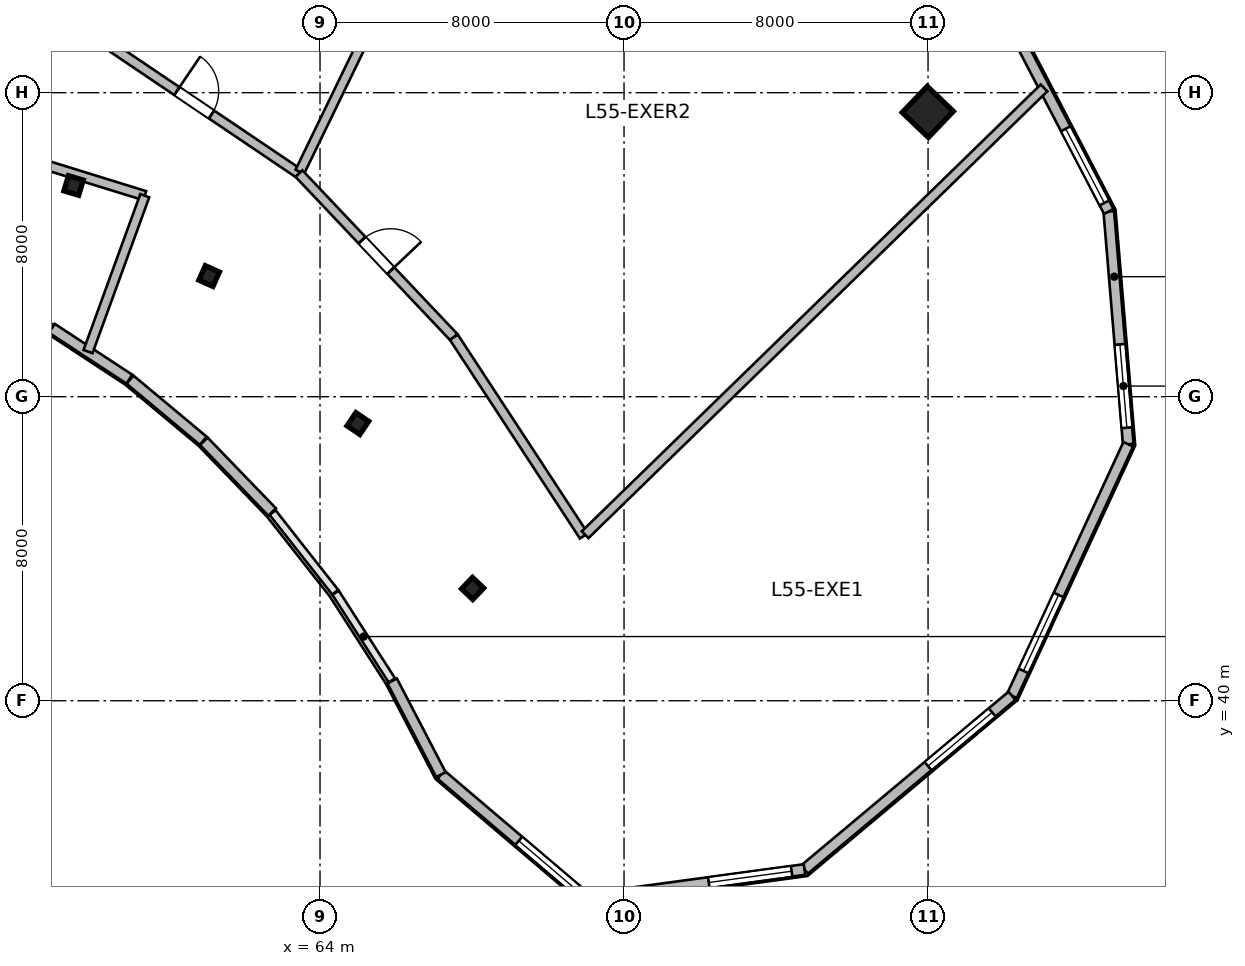
"""IFC4 building model, lengths in metres.
Left out: names, types, materials, properties, quantities, classifications, styles, units other than length and angle.
Written with IfcOpenShell. Run it as: python <this file> out.ifc"""

import sys

from ifc_helpers import new_model, si_unit, direction, frame, frame_2d, origin, origin_2d, place, context, subcontext, project, spatial, rectangle, i_section, extrude, source, transform, mapped, element, fill, save


model = new_model("IFC4")
c1 = context("Model", 3, precision=1e-05, world=origin(), true_north=direction((0.0, 1.0)))
c2 = subcontext(c1, "Body", "Model", "MODEL_VIEW")
j1 = project(units=[si_unit("LENGTHUNIT", "METRE"), si_unit("PLANEANGLEUNIT", "RADIAN")], contexts=[c1])
p1 = place(None, origin())
s1 = spatial("IfcSite", under=j1, at=p1, CompositionType="ELEMENT")
p2 = place(p1, origin())
s2 = spatial("IfcBuilding", under=s1, at=p2, CompositionType="ELEMENT")
p3 = place(p2, frame((0.0, 0.0, 227.4)))
s3 = spatial("IfcBuildingStorey", under=s2, at=p3, CompositionType="ELEMENT", Elevation=227.4)
m1 = source(origin(), c2, "Body", "SweptSolid", [
    extrude(i_section(OverallWidth=0.406, OverallDepth=0.416, WebThickness=0.03, FlangeThickness=0.048, at=origin_2d()), origin(), (0.0, 0.0, 1.0), 3.9),
])
for number, where, z_axis, x_axis in (
    (1, (57.515, 53.558, 0.0), (0.0, 0.0, 1.0), (0.289, 0.957, 0.0)),
    (2, (61.082, 51.175, 0.0), (0.0, 0.0, 1.0), (0.409, 0.912, 0.0)),
    (3, (64.996, 47.294, 0.0), (0.0, 0.0, 1.0), (0.558, 0.83, 0.0)),
    (4, (68.015, 42.955, 0.0), (0.0, 0.0, 1.0), (0.691, 0.723, 0.0)),
):
    element("IfcColumn", number, at=place(p3, frame(where, z_axis=z_axis, x_axis=x_axis)), inside=s3, PredefinedType="COLUMN", context=c2, shape_type="MappedRepresentation", body=[
        mapped(m1, transform((0.0, 0.0, 0.0), scale=1.0)),
    ])
m2 = source(origin(), c2, "Body", "SweptSolid", [
    extrude(rectangle(XDim=0.95, YDim=0.95, at=origin_2d()), origin(), (0.0, 0.0, 1.0), 3.9),
])
p4 = place(p3, frame((79.993, 55.494, 0.0), z_axis=(0.0, 0.0, 1.0), x_axis=(0.690756218984, 0.723087716626, 0.0)))
e5 = element("IfcColumn", 5, at=p4, inside=s3, PredefinedType="COLUMN", context=c2, shape_type="MappedRepresentation", body=[
    mapped(m2, transform((0.0, 0.0, 0.0), scale=1.0)),
])
m3 = source(origin(), c2, "Body", "SweptSolid", [
    extrude(rectangle(XDim=6.146, YDim=0.28, at=frame_2d((3.073, 0.0))), origin(), (0.0, 0.0, 1.0), 3.65),
])
p5 = place(p3, frame((84.756, 52.874, 0.0), z_axis=(0.0, 0.0, 1.0), x_axis=(0.083301904456, -0.996524356307, 0.0)))
e6 = element("IfcWall", 6, at=p5, inside=s3, PredefinedType="SOLIDWALL", context=c2, shape_type="MappedRepresentation", body=[
    mapped(m3, transform((0.0, 0.0, 0.0), scale=1.0)),
])
p6 = place(p5, frame((3.509, 0.0, 0.95)))
e7 = element("IfcOpeningElement", 7, at=p6, cuts=e6, PredefinedType="OPENING", context=c2, shape_type="SweptSolid", body=[
    extrude(rectangle(XDim=2.2, YDim=2.1, at=frame_2d((1.1, 1.05))), frame((0.0, 0.15, 0.0), z_axis=(0.0, -1.0, 0.0), x_axis=(1.0, 0.0, 0.0)), (0.0, 0.0, 1.0), 0.3),
])
m4 = source(origin(), c2, "Body", "SweptSolid", [
    extrude(rectangle(XDim=7.292, YDim=0.28, at=frame_2d((3.646, 0.0))), origin(), (0.0, 0.0, 1.0), 3.65),
])
p7 = place(p3, frame((85.268, 46.749, 0.0), z_axis=(0.0, 0.0, 1.0), x_axis=(-0.419642001049, -0.907689699708, 0.0)))
e8 = element("IfcWall", 8, at=p7, inside=s3, PredefinedType="SOLIDWALL", context=c2, shape_type="MappedRepresentation", body=[
    mapped(m4, transform((0.0, 0.0, 0.0), scale=1.0)),
])
p8 = place(p7, frame((4.369, 0.0, 0.95)))
e9 = element("IfcOpeningElement", 9, at=p8, cuts=e8, PredefinedType="OPENING", context=c2, shape_type="SweptSolid", body=[
    extrude(rectangle(XDim=2.2, YDim=2.1, at=frame_2d((1.1, 1.05))), frame((0.0, 0.15, 0.0), z_axis=(0.0, -1.0, 0.0), x_axis=(1.0, 0.0, 0.0)), (0.0, 0.0, 1.0), 0.3),
])
m5 = source(origin(), c2, "Body", "SweptSolid", [
    extrude(rectangle(XDim=7.12, YDim=0.28, at=frame_2d((3.56, 0.0))), origin(), (0.0, 0.0, 1.0), 3.65),
])
p9 = place(p3, frame((82.208, 40.131, 0.0), z_axis=(0.0, 0.0, 1.0), x_axis=(-0.766709783564, -0.641993853387, 0.0)))
e10 = element("IfcWall", 10, at=p9, inside=s3, PredefinedType="SOLIDWALL", context=c2, shape_type="MappedRepresentation", body=[
    mapped(m5, transform((0.0, 0.0, 0.0), scale=1.0)),
])
p10 = place(p9, frame((0.68, 0.0, 0.95)))
e11 = element("IfcOpeningElement", 11, at=p10, cuts=e10, PredefinedType="OPENING", context=c2, shape_type="SweptSolid", body=[
    extrude(rectangle(XDim=2.2, YDim=2.1, at=frame_2d((1.1, 1.05))), frame((0.0, 0.15, 0.0), z_axis=(0.0, -1.0, 0.0), x_axis=(1.0, 0.0, 0.0)), (0.0, 0.0, 1.0), 0.3),
])
m6 = source(origin(), c2, "Body", "SweptSolid", [
    extrude(rectangle(XDim=5.771, YDim=0.28, at=frame_2d((2.886, 0.0))), origin(), (0.0, 0.0, 1.0), 3.65),
])
p11 = place(p3, frame((76.75, 35.56, 0.0), z_axis=(0.0, 0.0, 1.0), x_axis=(-0.990933615537, -0.134352408237, 0.0)))
e12 = element("IfcWall", 12, at=p11, inside=s3, PredefinedType="SOLIDWALL", context=c2, shape_type="MappedRepresentation", body=[
    mapped(m6, transform((0.0, 0.0, 0.0), scale=1.0)),
])
p12 = place(p11, frame((0.343, 0.0, 0.95)))
e13 = element("IfcOpeningElement", 13, at=p12, cuts=e12, PredefinedType="OPENING", context=c2, shape_type="SweptSolid", body=[
    extrude(rectangle(XDim=2.2, YDim=2.1, at=frame_2d((1.1, 1.05))), frame((0.0, 0.15, 0.0), z_axis=(0.0, -1.0, 0.0), x_axis=(1.0, 0.0, 0.0)), (0.0, 0.0, 1.0), 0.3),
])
m7 = source(origin(), c2, "Body", "SweptSolid", [
    extrude(rectangle(XDim=5.051, YDim=0.28, at=frame_2d((2.525, 0.0))), origin(), (0.0, 0.0, 1.0), 3.65),
])
p13 = place(p3, frame((71.031, 34.784, 0.0), z_axis=(0.0, 0.0, 1.0), x_axis=(-0.761904731537, 0.647689107568, 0.0)))
e14 = element("IfcWall", 14, at=p13, inside=s3, PredefinedType="SOLIDWALL", context=c2, shape_type="MappedRepresentation", body=[
    mapped(m7, transform((0.0, 0.0, 0.0), scale=1.0)),
])
p14 = place(p13, frame((0.163, 0.0, 0.95)))
e15 = element("IfcOpeningElement", 15, at=p14, cuts=e14, PredefinedType="OPENING", context=c2, shape_type="SweptSolid", body=[
    extrude(rectangle(XDim=2.2, YDim=2.1, at=frame_2d((1.1, 1.05))), frame((0.0, 0.15, 0.0), z_axis=(0.0, -1.0, 0.0), x_axis=(1.0, 0.0, 0.0)), (0.0, 0.0, 1.0), 0.3),
])
m8 = source(origin(), c2, "Body", "SweptSolid", [
    extrude(rectangle(XDim=2.779, YDim=0.28, at=frame_2d((1.39, 0.0))), origin(), (0.0, 0.0, 1.0), 3.65),
])
p15 = place(p3, frame((67.182, 38.056, 0.0), z_axis=(0.0, 0.0, 1.0), x_axis=(-0.461770308601, 0.886999538948, 0.0)))
e16 = element("IfcWall", 16, at=p15, inside=s3, PredefinedType="SOLIDWALL", context=c2, shape_type="MappedRepresentation", body=[
    mapped(m8, transform((0.0, 0.0, 0.0), scale=1.0)),
])
m9 = source(origin(), c2, "Body", "SweptSolid", [
    extrude(rectangle(XDim=2.588, YDim=0.28, at=frame_2d((1.294, 0.0))), origin(), (0.0, 0.0, 1.0), 3.65),
])
p16 = place(p3, frame((62.74, 44.966, 0.0), z_axis=(0.0, 0.0, 1.0), x_axis=(-0.694687114507, 0.719312041424, 0.0)))
e17 = element("IfcWall", 17, at=p16, inside=s3, PredefinedType="SOLIDWALL", context=c2, shape_type="MappedRepresentation", body=[
    mapped(m9, transform((0.0, 0.0, 0.0), scale=1.0)),
])
m10 = source(origin(), c2, "Body", "SweptSolid", [
    extrude(rectangle(XDim=2.511, YDim=0.28, at=frame_2d((1.256, 0.0))), origin(), (0.0, 0.0, 1.0), 3.65),
])
p17 = place(p3, frame((60.928, 46.841, 0.0), z_axis=(0.0, 0.0, 1.0), x_axis=(-0.767910416122, 0.640557251782, 0.0)))
e18 = element("IfcWall", 18, at=p17, inside=s3, PredefinedType="SOLIDWALL", context=c2, shape_type="MappedRepresentation", body=[
    mapped(m10, transform((0.0, 0.0, 0.0), scale=1.0)),
])
m11 = source(origin(), c2, "Body", "SweptSolid", [
    extrude(rectangle(XDim=2.44, YDim=0.28, at=frame_2d((1.22, 0.0))), origin(), (0.0, 0.0, 1.0), 3.65),
])
p18 = place(p3, frame((58.983, 48.462, 0.0), z_axis=(0.0, 0.0, 1.0), x_axis=(-0.83598480459, 0.548752591333, 0.0)))
e19 = element("IfcWall", 19, at=p18, inside=s3, PredefinedType="SOLIDWALL", context=c2, shape_type="MappedRepresentation", body=[
    mapped(m11, transform((0.0, 0.0, 0.0), scale=1.0)),
])
m12 = source(origin(), c2, "Body", "SweptSolid", [
    extrude(rectangle(XDim=5.416, YDim=0.28, at=frame_2d((2.708, 0.0))), origin(), (0.0, 0.0, 1.0), 3.65),
])
p19 = place(p3, frame((82.255, 57.677, 0.0), z_axis=(0.0, 0.0, 1.0), x_axis=(0.46177852435, -0.886995261796, 0.0)))
e20 = element("IfcWall", 20, at=p19, inside=s3, PredefinedType="SOLIDWALL", context=c2, shape_type="MappedRepresentation", body=[
    mapped(m12, transform((0.0, 0.0, 0.0), scale=1.0)),
])
p20 = place(p19, frame((2.962, 0.0, 0.95)))
e21 = element("IfcOpeningElement", 21, at=p20, cuts=e20, PredefinedType="OPENING", context=c2, shape_type="SweptSolid", body=[
    extrude(rectangle(XDim=2.2, YDim=2.1, at=frame_2d((1.1, 1.05))), frame((0.0, 0.15, 0.0), z_axis=(0.0, -1.0, 0.0), x_axis=(1.0, 0.0, 0.0)), (0.0, 0.0, 1.0), 0.3),
])
m13 = source(origin(), c2, "Body", "SweptSolid", [
    extrude(rectangle(XDim=11.921, YDim=0.25, at=frame_2d((5.961, 0.0))), origin(), (0.0, 0.0, 1.0), 3.095),
])
p21 = place(p3, frame((48.0, 56.813, 0.0), z_axis=(0.0, 0.0, 1.0), x_axis=(0.955326235971, -0.295553350287, 0.0)))
e22 = element("IfcWall", 22, at=p21, inside=s3, PredefinedType="PARTITIONING", context=c2, shape_type="MappedRepresentation", body=[
    mapped(m13, transform((0.0, 0.0, 0.0), scale=1.0)),
])
p22 = place(p21, frame((5.611, 0.0, 0.0)))
e23 = element("IfcOpeningElement", 23, at=p22, cuts=e22, PredefinedType="OPENING", context=c2, shape_type="SweptSolid", body=[
    extrude(rectangle(XDim=1.1, YDim=2.15, at=frame_2d((0.55, 1.075))), frame((0.0, 0.135, 0.0), z_axis=(0.0, -1.0, 0.0), x_axis=(1.0, 0.0, 0.0)), (0.0, 0.0, 1.0), 0.27),
])
m14 = source(origin(), c2, "Body", "SweptSolid", [
    extrude(rectangle(XDim=4.366, YDim=0.25, at=frame_2d((2.183, 0.0))), origin(), (0.0, 0.0, 1.0), 3.65),
])
p23 = place(p3, frame((57.896, 49.187, 0.0), z_axis=(0.0, 0.0, 1.0), x_axis=(0.342061827486, 0.939677447945, 0.0)))
e24 = element("IfcWall", 24, at=p23, inside=s3, PredefinedType="PARTITIONING", context=c2, shape_type="MappedRepresentation", body=[
    mapped(m14, transform((0.0, 0.0, 0.0), scale=1.0)),
])
m15 = source(origin(), c2, "Body", "SweptSolid", [
    extrude(rectangle(XDim=6.654, YDim=0.25, at=frame_2d((3.327, 0.0))), origin(), (0.0, 0.0, 1.0), 3.217),
])
p24 = place(p3, frame((57.932, 57.596, 0.0), z_axis=(0.0, 0.0, 1.0), x_axis=(0.828704875625, -0.559685830726, 0.0)))
e25 = element("IfcWall", 25, at=p24, inside=s3, PredefinedType="PARTITIONING", context=c2, shape_type="MappedRepresentation", body=[
    mapped(m15, transform((0.0, 0.0, 0.0), scale=1.0)),
])
p25 = place(p24, frame((2.777, 0.0, 0.0)))
e26 = element("IfcOpeningElement", 26, at=p25, cuts=e25, PredefinedType="OPENING", context=c2, shape_type="SweptSolid", body=[
    extrude(rectangle(XDim=1.1, YDim=2.15, at=frame_2d((0.55, 1.075))), frame((0.0, 0.135, 0.0), z_axis=(0.0, -1.0, 0.0), x_axis=(1.0, 0.0, 0.0)), (0.0, 0.0, 1.0), 0.27),
])
m16 = source(origin(), c2, "Body", "SweptSolid", [
    extrude(rectangle(XDim=18.664, YDim=0.25, at=frame_2d((9.332, 0.0))), origin(), (0.0, 0.0, 1.0), 3.65),
])
p26 = place(p3, frame((63.468, 53.917, 0.0), z_axis=(0.0, 0.0, 1.0), x_axis=(0.43611848828, 0.899889251064, 0.0)))
e27 = element("IfcWall", 27, at=p26, inside=s3, PredefinedType="PARTITIONING", context=c2, shape_type="MappedRepresentation", body=[
    mapped(m16, transform((0.0, 0.0, 0.0), scale=1.0)),
])
m17 = source(origin(), c2, "Body", "SweptSolid", [
    extrude(rectangle(XDim=5.929, YDim=0.25, at=frame_2d((2.964, 0.0))), origin(), (0.0, 0.0, 1.0), 3.65),
])
p27 = place(p3, frame((63.446, 53.872, 0.0), z_axis=(0.0, 0.0, 1.0), x_axis=(0.687445334019, -0.726236127396, 0.0)))
e28 = element("IfcWall", 28, at=p27, inside=s3, PredefinedType="PARTITIONING", context=c2, shape_type="MappedRepresentation", body=[
    mapped(m17, transform((0.0, 0.0, 0.0), scale=1.0)),
])
p28 = place(p27, frame((2.414, 0.0, 0.0)))
e29 = element("IfcOpeningElement", 29, at=p28, cuts=e28, PredefinedType="OPENING", context=c2, shape_type="SweptSolid", body=[
    extrude(rectangle(XDim=1.1, YDim=2.15, at=frame_2d((0.55, 1.075))), frame((0.0, 0.135, 0.0), z_axis=(0.0, -1.0, 0.0), x_axis=(1.0, 0.0, 0.0)), (0.0, 0.0, 1.0), 0.27),
])
m18 = source(origin(), c2, "Body", "SweptSolid", [
    extrude(rectangle(XDim=6.249, YDim=0.25, at=frame_2d((3.125, 0.0))), origin(), (0.0, 0.0, 1.0), 3.217),
])
p29 = place(p3, frame((67.522, 49.566, 0.0), z_axis=(0.0, 0.0, 1.0), x_axis=(0.547611432082, -0.836732764659, 0.0)))
e30 = element("IfcWall", 30, at=p29, inside=s3, PredefinedType="PARTITIONING", context=c2, shape_type="MappedRepresentation", body=[
    mapped(m18, transform((0.0, 0.0, 0.0), scale=1.0)),
])
m19 = source(origin(), c2, "Body", "SweptSolid", [
    extrude(rectangle(XDim=16.854, YDim=0.25, at=frame_2d((8.427, 0.0))), origin(), (0.0, 0.0, 1.0), 3.65),
])
p30 = place(p3, frame((70.976, 44.369, 0.0), z_axis=(0.0, 0.0, 1.0), x_axis=(0.716517105841, 0.697569521294, 0.0)))
e31 = element("IfcWall", 31, at=p30, inside=s3, PredefinedType="PARTITIONING", context=c2, shape_type="MappedRepresentation", body=[
    mapped(m19, transform((0.0, 0.0, 0.0), scale=1.0)),
])
m20 = source(origin(), c2, "Body", "SweptSolid", [
    extrude(rectangle(XDim=2.2, YDim=2.1, at=frame_2d((1.1, 1.05))), frame((0.0, 0.03, 0.0), z_axis=(0.0, -1.0, 0.0), x_axis=(1.0, 0.0, 0.0)), (0.0, 0.0, 1.0), 0.06),
])
p31 = place(p6, origin())
e32 = element("IfcWindow", 32, at=p31, inside=s3, PartitioningType="TRIPLE_PANEL_VERTICAL", PredefinedType="WINDOW", context=c2, shape_type="MappedRepresentation", body=[
    mapped(m20, transform((0.0, 0.0, 0.0), scale=1.0)),
])
fill(e7, e32)
p32 = place(p8, origin())
e33 = element("IfcWindow", 33, at=p32, inside=s3, PartitioningType="TRIPLE_PANEL_VERTICAL", PredefinedType="WINDOW", context=c2, shape_type="MappedRepresentation", body=[
    mapped(m20, transform((0.0, 0.0, 0.0), scale=1.0)),
])
fill(e9, e33)
p33 = place(p10, origin())
e34 = element("IfcWindow", 34, at=p33, inside=s3, PartitioningType="TRIPLE_PANEL_VERTICAL", PredefinedType="WINDOW", context=c2, shape_type="MappedRepresentation", body=[
    mapped(m20, transform((0.0, 0.0, 0.0), scale=1.0)),
])
fill(e11, e34)
p34 = place(p12, origin())
e35 = element("IfcWindow", 35, at=p34, inside=s3, PartitioningType="TRIPLE_PANEL_VERTICAL", PredefinedType="WINDOW", context=c2, shape_type="MappedRepresentation", body=[
    mapped(m20, transform((0.0, 0.0, 0.0), scale=1.0)),
])
fill(e13, e35)
p35 = place(p14, origin())
e36 = element("IfcWindow", 36, at=p35, inside=s3, PartitioningType="TRIPLE_PANEL_VERTICAL", PredefinedType="WINDOW", context=c2, shape_type="MappedRepresentation", body=[
    mapped(m20, transform((0.0, 0.0, 0.0), scale=1.0)),
])
fill(e15, e36)
p36 = place(p20, origin())
e37 = element("IfcWindow", 37, at=p36, inside=s3, PartitioningType="TRIPLE_PANEL_VERTICAL", PredefinedType="WINDOW", context=c2, shape_type="MappedRepresentation", body=[
    mapped(m20, transform((0.0, 0.0, 0.0), scale=1.0)),
])
fill(e21, e37)
m21 = source(origin(), c2, "Body", "SweptSolid", [
    extrude(rectangle(XDim=1.1, YDim=2.15, at=frame_2d((0.55, 1.075))), frame((0.0, 0.025, 0.0), z_axis=(0.0, -1.0, 0.0), x_axis=(1.0, 0.0, 0.0)), (0.0, 0.0, 1.0), 0.05),
])
p37 = place(p25, origin())
e38 = element("IfcDoor", 38, at=p37, inside=s3, OperationType="SINGLE_SWING_LEFT", PredefinedType="DOOR", context=c2, shape_type="MappedRepresentation", body=[
    mapped(m21, transform((0.0, 0.0, 0.0), scale=1.0)),
])
fill(e26, e38)
p38 = place(p28, origin())
e39 = element("IfcDoor", 39, at=p38, inside=s3, OperationType="SINGLE_SWING_RIGHT", PredefinedType="DOOR", context=c2, shape_type="MappedRepresentation", body=[
    mapped(m21, transform((0.0, 0.0, 0.0), scale=1.0)),
])
fill(e29, e39)
save(model, sys.argv[1])
